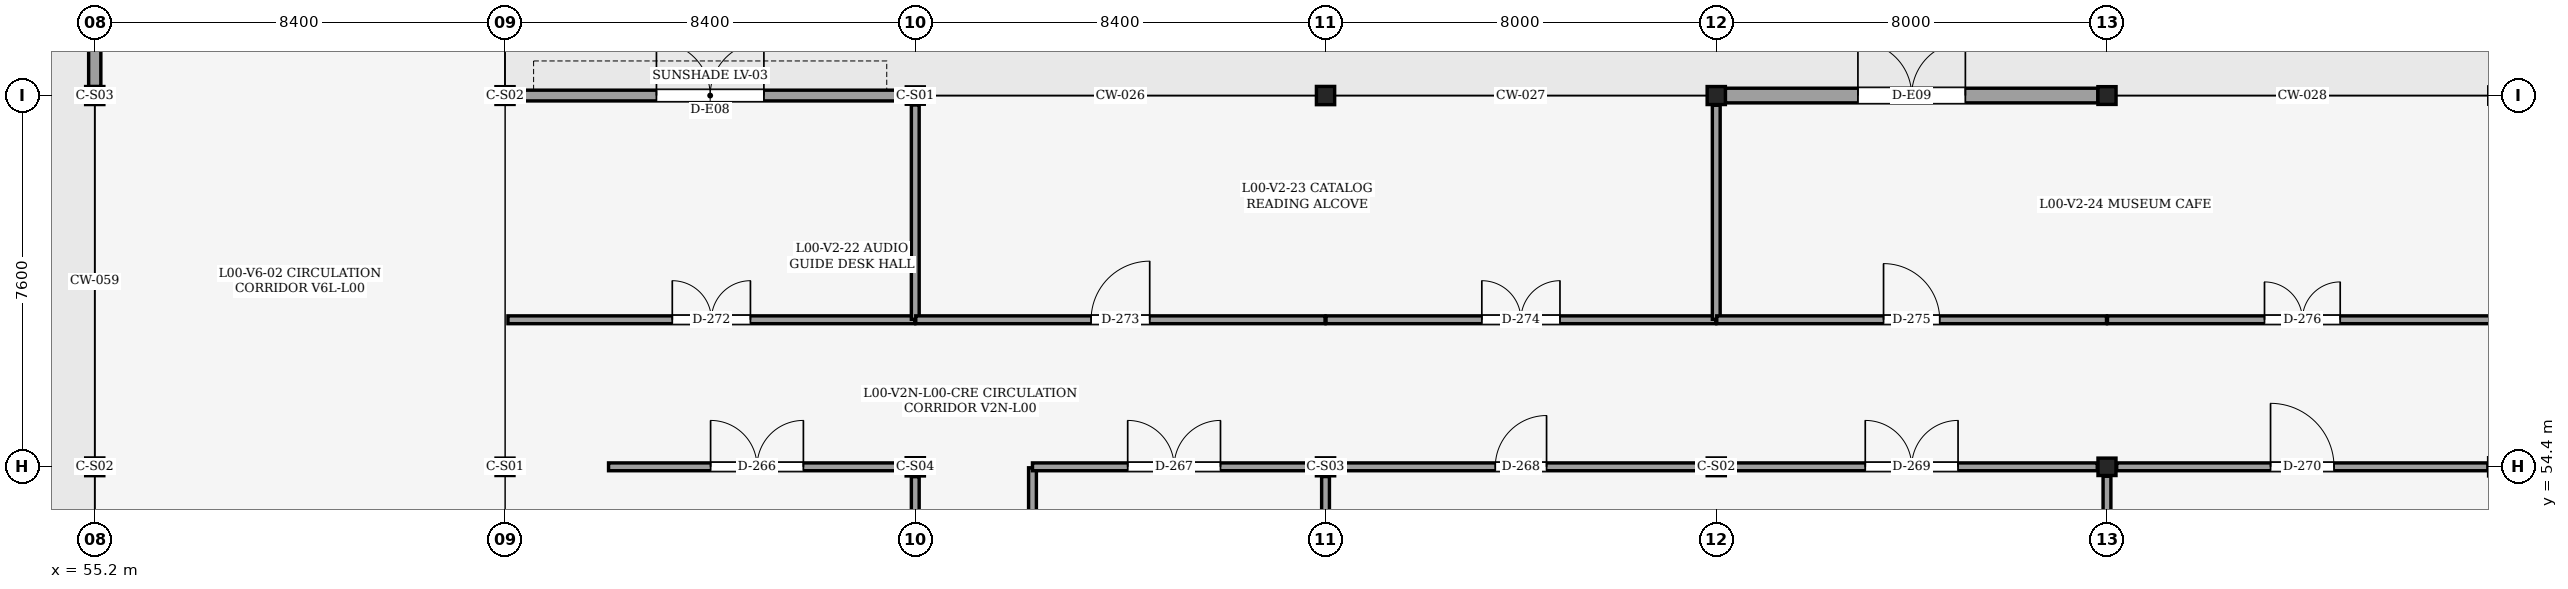
"""IFC4 building model, lengths in metres.
Left out: names, types, materials, properties, quantities, classifications, styles, units other than length and angle.
Written with IfcOpenShell. Run it as: python <this file> out.ifc"""

import sys

from ifc_helpers import new_model, si_unit, direction, frame, frame_2d, origin, origin_2d, place, context, subcontext, project, spatial, rectangle, i_section, extrude, element, fill, save


model = new_model("IFC4")
c1 = context("Model", 3, precision=1e-05, world=origin(), true_north=direction((0.0, 1.0)))
c2 = subcontext(c1, "Body", "Model", "MODEL_VIEW")
j1 = project(units=[si_unit("LENGTHUNIT", "METRE"), si_unit("PLANEANGLEUNIT", "RADIAN")], contexts=[c1])
p1 = place(None, origin())
s1 = spatial("IfcSite", under=j1, at=p1, CompositionType="ELEMENT")
p2 = place(p1, origin())
s2 = spatial("IfcBuilding", under=s1, at=p2, CompositionType="ELEMENT")
p3 = place(p2, origin())
s3 = spatial("IfcBuildingStorey", under=s2, at=p3, CompositionType="ELEMENT", Elevation=0.0)
p4 = place(p3, frame((55.2, 54.4, 0.0), z_axis=(0.0, 0.0, 1.0), x_axis=(1.0, 0.0, 0.0)))
e1 = element("IfcColumn", 1, at=p4, inside=s3, PredefinedType="COLUMN", context=c2, shape_type="SweptSolid", body=[
    extrude(i_section(OverallWidth=0.371, OverallDepth=0.363, WebThickness=0.013, FlangeThickness=0.022, FilletRadius=0.025, at=origin_2d()), origin(), (0.0, 0.0, 1.0), 5.4),
])
p5 = place(p3, frame((55.2, 62.0, 0.0), z_axis=(0.0, 0.0, 1.0), x_axis=(1.0, 0.0, 0.0)))
e2 = element("IfcColumn", 2, at=p5, inside=s3, PredefinedType="COLUMN", context=c2, shape_type="SweptSolid", body=[
    extrude(i_section(OverallWidth=0.373, OverallDepth=0.368, WebThickness=0.015, FlangeThickness=0.024, FilletRadius=0.025, at=origin_2d()), origin(), (0.0, 0.0, 1.0), 5.4),
])
p6 = place(p3, frame((63.6, 54.4, 0.0), z_axis=(0.0, 0.0, 1.0), x_axis=(1.0, 0.0, 0.0)))
e3 = element("IfcColumn", 3, at=p6, inside=s3, PredefinedType="COLUMN", context=c2, shape_type="SweptSolid", body=[
    extrude(i_section(OverallWidth=0.368, OverallDepth=0.356, WebThickness=0.011, FlangeThickness=0.018, FilletRadius=0.025, at=origin_2d()), origin(), (0.0, 0.0, 1.0), 5.4),
])
p7 = place(p3, frame((63.6, 62.0, 0.0), z_axis=(0.0, 0.0, 1.0), x_axis=(1.0, 0.0, 0.0)))
e4 = element("IfcColumn", 4, at=p7, inside=s3, PredefinedType="COLUMN", context=c2, shape_type="SweptSolid", body=[
    extrude(i_section(OverallWidth=0.371, OverallDepth=0.363, WebThickness=0.013, FlangeThickness=0.022, FilletRadius=0.025, at=origin_2d()), origin(), (0.0, 0.0, 1.0), 5.4),
])
p8 = place(p3, frame((72.0, 54.4, 0.0), z_axis=(0.0, 0.0, 1.0), x_axis=(1.0, 0.0, 0.0)))
e5 = element("IfcColumn", 5, at=p8, inside=s3, PredefinedType="COLUMN", context=c2, shape_type="SweptSolid", body=[
    extrude(i_section(OverallWidth=0.373, OverallDepth=0.373, WebThickness=0.016, FlangeThickness=0.026, FilletRadius=0.025, at=origin_2d()), origin(), (0.0, 0.0, 1.0), 5.4),
])
p9 = place(p3, frame((72.0, 62.0, 0.0), z_axis=(0.0, 0.0, 1.0), x_axis=(1.0, 0.0, 0.0)))
e6 = element("IfcColumn", 6, at=p9, inside=s3, PredefinedType="COLUMN", context=c2, shape_type="SweptSolid", body=[
    extrude(i_section(OverallWidth=0.368, OverallDepth=0.356, WebThickness=0.011, FlangeThickness=0.018, FilletRadius=0.025, at=origin_2d()), origin(), (0.0, 0.0, 1.0), 5.4),
])
p10 = place(p3, frame((80.4, 54.4, 0.0), z_axis=(0.0, 0.0, 1.0), x_axis=(1.0, 0.0, 0.0)))
e7 = element("IfcColumn", 7, at=p10, inside=s3, PredefinedType="COLUMN", context=c2, shape_type="SweptSolid", body=[
    extrude(i_section(OverallWidth=0.373, OverallDepth=0.368, WebThickness=0.015, FlangeThickness=0.024, FilletRadius=0.025, at=origin_2d()), origin(), (0.0, 0.0, 1.0), 5.4),
])
p11 = place(p3, frame((80.4, 62.0, 0.0), z_axis=(0.0, 0.0, 1.0), x_axis=(1.0, 0.0, 0.0)))
e8 = element("IfcColumn", 8, at=p11, inside=s3, PredefinedType="COLUMN", context=c2, shape_type="SweptSolid", body=[
    extrude(i_section(OverallWidth=0.373, OverallDepth=0.373, WebThickness=0.016, FlangeThickness=0.026, FilletRadius=0.025, at=origin_2d()), origin(), (0.0, 0.0, 1.0), 5.4),
])
p12 = place(p3, frame((88.4, 54.4, 0.0), z_axis=(0.0, 0.0, 1.0), x_axis=(1.0, 0.0, 0.0)))
e9 = element("IfcColumn", 9, at=p12, inside=s3, PredefinedType="COLUMN", context=c2, shape_type="SweptSolid", body=[
    extrude(i_section(OverallWidth=0.371, OverallDepth=0.363, WebThickness=0.013, FlangeThickness=0.022, FilletRadius=0.025, at=origin_2d()), origin(), (0.0, 0.0, 1.0), 5.4),
])
p13 = place(p3, frame((88.4, 62.0, 0.0), z_axis=(0.0, 0.0, 1.0), x_axis=(1.0, 0.0, 0.0)))
e10 = element("IfcColumn", 10, at=p13, inside=s3, PredefinedType="COLUMN", context=c2, shape_type="SweptSolid", body=[
    extrude(i_section(OverallWidth=0.373, OverallDepth=0.368, WebThickness=0.015, FlangeThickness=0.024, FilletRadius=0.025, at=origin_2d()), origin(), (0.0, 0.0, 1.0), 5.4),
])
p14 = place(p3, frame((96.4, 54.4, 0.0), z_axis=(0.0, 0.0, 1.0), x_axis=(1.0, 0.0, 0.0)))
e11 = element("IfcColumn", 11, at=p14, inside=s3, PredefinedType="COLUMN", context=c2, shape_type="SweptSolid", body=[
    extrude(i_section(OverallWidth=0.368, OverallDepth=0.356, WebThickness=0.011, FlangeThickness=0.018, FilletRadius=0.025, at=origin_2d()), origin(), (0.0, 0.0, 1.0), 5.4),
])
p15 = place(p3, frame((96.4, 62.0, 0.0), z_axis=(0.0, 0.0, 1.0), x_axis=(1.0, 0.0, 0.0)))
e12 = element("IfcColumn", 12, at=p15, inside=s3, PredefinedType="COLUMN", context=c2, shape_type="SweptSolid", body=[
    extrude(i_section(OverallWidth=0.371, OverallDepth=0.363, WebThickness=0.013, FlangeThickness=0.022, FilletRadius=0.025, at=origin_2d()), origin(), (0.0, 0.0, 1.0), 5.4),
])
p16 = place(p3, frame((63.785, 62.0, 0.0), z_axis=(0.0, 0.0, 1.0), x_axis=(1.0, 0.0, 0.0)))
e13 = element("IfcWall", 13, at=p16, inside=s3, PredefinedType="SOLIDWALL", context=c2, shape_type="SweptSolid", body=[
    extrude(rectangle(XDim=8.031, YDim=0.22, at=frame_2d((4.015, 0.0))), origin(), (0.0, 0.0, 1.0), 4.886),
])
p17 = place(p16, frame((2.915, 0.0, 0.0)))
e14 = element("IfcOpeningElement", 14, at=p17, cuts=e13, PredefinedType="OPENING", context=c2, shape_type="SweptSolid", body=[
    extrude(rectangle(XDim=2.2, YDim=2.4, at=frame_2d((1.1, 1.2))), frame((0.0, 0.12, 0.0), z_axis=(0.0, -1.0, 0.0), x_axis=(1.0, 0.0, 0.0)), (0.0, 0.0, 1.0), 0.24),
])
p18 = place(p3, frame((88.586, 62.0, 0.0), z_axis=(0.0, 0.0, 1.0), x_axis=(1.0, 0.0, 0.0)))
e15 = element("IfcWall", 15, at=p18, inside=s3, PredefinedType="SOLIDWALL", context=c2, shape_type="SweptSolid", body=[
    extrude(rectangle(XDim=7.628, YDim=0.3, at=frame_2d((3.814, 0.0))), origin(), (0.0, 0.0, 1.0), 4.886),
])
p19 = place(p18, frame((2.714, 0.0, 0.0)))
e16 = element("IfcOpeningElement", 16, at=p19, cuts=e15, PredefinedType="OPENING", context=c2, shape_type="SweptSolid", body=[
    extrude(rectangle(XDim=2.2, YDim=2.4, at=frame_2d((1.1, 1.2))), frame((0.0, 0.16, 0.0), z_axis=(0.0, -1.0, 0.0), x_axis=(1.0, 0.0, 0.0)), (0.0, 0.0, 1.0), 0.321),
])
p20 = place(p3, frame((55.2, 62.184, 0.0), z_axis=(0.0, 0.0, 1.0), x_axis=(0.0, 1.0, 0.0)))
e17 = element("IfcWall", 17, at=p20, inside=s3, PredefinedType="SOLIDWALL", context=c2, shape_type="SweptSolid", body=[
    extrude(rectangle(XDim=7.229, YDim=0.25, at=frame_2d((3.615, 0.0))), origin(), (0.0, 0.0, 1.0), 4.533),
])
p21 = place(p20, frame((0.75, 0.0, 0.9)))
e18 = element("IfcOpeningElement", 18, at=p21, cuts=e17, PredefinedType="OPENING", context=c2, shape_type="SweptSolid", body=[
    extrude(rectangle(XDim=1.2, YDim=1.5, at=frame_2d((0.6, 0.75))), frame((0.0, 0.135, 0.0), z_axis=(0.0, -1.0, 0.0), x_axis=(1.0, 0.0, 0.0)), (0.0, 0.0, 1.0), 0.271),
])
p22 = place(p3, frame((65.72, 54.4, 0.0), z_axis=(0.0, 0.0, 1.0), x_axis=(1.0, 0.0, 0.0)))
e19 = element("IfcWall", 19, at=p22, inside=s3, PredefinedType="PARTITIONING", context=c2, shape_type="SweptSolid", body=[
    extrude(rectangle(XDim=6.079, YDim=0.16, at=frame_2d((3.039, 0.0))), origin(), (0.0, 0.0, 1.0), 4.518),
])
p23 = place(p22, frame((2.089, 0.0, 0.0)))
e20 = element("IfcOpeningElement", 20, at=p23, cuts=e19, PredefinedType="OPENING", context=c2, shape_type="SweptSolid", body=[
    extrude(rectangle(XDim=1.9, YDim=2.45, at=frame_2d((0.95, 1.225))), frame((0.0, 0.09, 0.0), z_axis=(0.0, -1.0, 0.0), x_axis=(1.0, 0.0, 0.0)), (0.0, 0.0, 1.0), 0.18),
])
p24 = place(p3, frame((72.0, 47.023, 0.0), z_axis=(0.0, 0.0, 1.0), x_axis=(0.0, 1.0, 0.0)))
e21 = element("IfcWall", 21, at=p24, inside=s3, PredefinedType="PARTITIONING", context=c2, shape_type="SweptSolid", body=[
    extrude(rectangle(XDim=7.175, YDim=0.16, at=frame_2d((3.587, 0.0))), origin(), (0.0, 0.0, 1.0), 4.533),
])
p25 = place(p3, frame((74.4, 46.84, 0.0), z_axis=(0.0, 0.0, 1.0), x_axis=(0.0, 1.0, 0.0)))
e22 = element("IfcWall", 22, at=p25, inside=s3, PredefinedType="PARTITIONING", context=c2, shape_type="SweptSolid", body=[
    extrude(rectangle(XDim=7.54, YDim=0.16, at=frame_2d((3.77, 0.0))), origin(), (0.0, 0.0, 1.0), 5.14),
])
p26 = place(p3, frame((74.4, 54.4, 0.0), z_axis=(0.0, 0.0, 1.0), x_axis=(1.0, 0.0, 0.0)))
e23 = element("IfcWall", 23, at=p26, inside=s3, PredefinedType="PARTITIONING", context=c2, shape_type="SweptSolid", body=[
    extrude(rectangle(XDim=5.799, YDim=0.16, at=frame_2d((2.899, 0.0))), origin(), (0.0, 0.0, 1.0), 4.528),
])
p27 = place(p26, frame((1.949, 0.0, 0.0)))
e24 = element("IfcOpeningElement", 24, at=p27, cuts=e23, PredefinedType="OPENING", context=c2, shape_type="SweptSolid", body=[
    extrude(rectangle(XDim=1.9, YDim=2.45, at=frame_2d((0.95, 1.225))), frame((0.0, 0.09, 0.0), z_axis=(0.0, -1.0, 0.0), x_axis=(1.0, 0.0, 0.0)), (0.0, 0.0, 1.0), 0.18),
])
p28 = place(p3, frame((80.4, 47.014, 0.0), z_axis=(0.0, 0.0, 1.0), x_axis=(0.0, 1.0, 0.0)))
e25 = element("IfcWall", 25, at=p28, inside=s3, PredefinedType="PARTITIONING", context=c2, shape_type="SweptSolid", body=[
    extrude(rectangle(XDim=7.187, YDim=0.16, at=frame_2d((3.593, 0.0))), origin(), (0.0, 0.0, 1.0), 4.607),
])
p29 = place(p3, frame((80.602, 54.4, 0.0), z_axis=(0.0, 0.0, 1.0), x_axis=(1.0, 0.0, 0.0)))
e26 = element("IfcWall", 26, at=p29, inside=s3, PredefinedType="PARTITIONING", context=c2, shape_type="SweptSolid", body=[
    extrude(rectangle(XDim=7.598, YDim=0.16, at=frame_2d((3.799, 0.0))), origin(), (0.0, 0.0, 1.0), 4.678),
])
p30 = place(p29, frame((3.274, 0.0, 0.0)))
e27 = element("IfcOpeningElement", 27, at=p30, cuts=e26, PredefinedType="OPENING", context=c2, shape_type="SweptSolid", body=[
    extrude(rectangle(XDim=1.05, YDim=2.15, at=frame_2d((0.525, 1.075))), frame((0.0, 0.09, 0.0), z_axis=(0.0, -1.0, 0.0), x_axis=(1.0, 0.0, 0.0)), (0.0, 0.0, 1.0), 0.18),
])
p31 = place(p3, frame((88.601, 54.4, 0.0), z_axis=(0.0, 0.0, 1.0), x_axis=(1.0, 0.0, 0.0)))
e28 = element("IfcWall", 28, at=p31, inside=s3, PredefinedType="PARTITIONING", context=c2, shape_type="SweptSolid", body=[
    extrude(rectangle(XDim=7.6, YDim=0.16, at=frame_2d((3.8, 0.0))), origin(), (0.0, 0.0, 1.0), 4.533),
])
p32 = place(p31, frame((2.85, 0.0, 0.0)))
e29 = element("IfcOpeningElement", 29, at=p32, cuts=e28, PredefinedType="OPENING", context=c2, shape_type="SweptSolid", body=[
    extrude(rectangle(XDim=1.9, YDim=2.45, at=frame_2d((0.95, 1.225))), frame((0.0, 0.09, 0.0), z_axis=(0.0, -1.0, 0.0), x_axis=(1.0, 0.0, 0.0)), (0.0, 0.0, 1.0), 0.18),
])
p33 = place(p3, frame((96.4, 47.001, 0.0), z_axis=(0.0, 0.0, 1.0), x_axis=(0.0, 1.0, 0.0)))
e30 = element("IfcWall", 30, at=p33, inside=s3, PredefinedType="PARTITIONING", context=c2, shape_type="SweptSolid", body=[
    extrude(rectangle(XDim=7.206, YDim=0.16, at=frame_2d((3.603, 0.0))), origin(), (0.0, 0.0, 1.0), 4.528),
])
p34 = place(p3, frame((96.599, 54.4, 0.0), z_axis=(0.0, 0.0, 1.0), x_axis=(1.0, 0.0, 0.0)))
e31 = element("IfcWall", 31, at=p34, inside=s3, PredefinedType="PARTITIONING", context=c2, shape_type="SweptSolid", body=[
    extrude(rectangle(XDim=7.599, YDim=0.16, at=frame_2d((3.8, 0.0))), origin(), (0.0, 0.0, 1.0), 4.591),
])
p35 = place(p34, frame((3.15, 0.0, 0.0)))
e32 = element("IfcOpeningElement", 32, at=p35, cuts=e31, PredefinedType="OPENING", context=c2, shape_type="SweptSolid", body=[
    extrude(rectangle(XDim=1.3, YDim=2.2, at=frame_2d((0.65, 1.1))), frame((0.0, 0.09, 0.0), z_axis=(0.0, -1.0, 0.0), x_axis=(1.0, 0.0, 0.0)), (0.0, 0.0, 1.0), 0.18),
])
p36 = place(p3, frame((63.66, 57.41, 0.0), z_axis=(0.0, 0.0, 1.0), x_axis=(1.0, 0.0, 0.0)))
e33 = element("IfcWall", 33, at=p36, inside=s3, PredefinedType="PARTITIONING", context=c2, shape_type="SweptSolid", body=[
    extrude(rectangle(XDim=8.33, YDim=0.16, at=frame_2d((4.165, 0.0))), origin(), (0.0, 0.0, 1.0), 5.14),
])
p37 = place(p36, frame((3.365, 0.0, 0.0)))
e34 = element("IfcOpeningElement", 34, at=p37, cuts=e33, PredefinedType="OPENING", context=c2, shape_type="SweptSolid", body=[
    extrude(rectangle(XDim=1.6, YDim=2.35, at=frame_2d((0.8, 1.175))), frame((0.0, 0.09, 0.0), z_axis=(0.0, -1.0, 0.0), x_axis=(1.0, 0.0, 0.0)), (0.0, 0.0, 1.0), 0.18),
])
p38 = place(p3, frame((72.0, 57.42, 0.0), z_axis=(0.0, 0.0, 1.0), x_axis=(0.0, 1.0, 0.0)))
e35 = element("IfcWall", 35, at=p38, inside=s3, PredefinedType="PARTITIONING", context=c2, shape_type="SweptSolid", body=[
    extrude(rectangle(XDim=4.387, YDim=0.16, at=frame_2d((2.193, 0.0))), origin(), (0.0, 0.0, 1.0), 4.607),
])
p39 = place(p3, frame((72.01, 57.41, 0.0), z_axis=(0.0, 0.0, 1.0), x_axis=(1.0, 0.0, 0.0)))
e36 = element("IfcWall", 36, at=p39, inside=s3, PredefinedType="PARTITIONING", context=c2, shape_type="SweptSolid", body=[
    extrude(rectangle(XDim=8.38, YDim=0.16, at=frame_2d((4.19, 0.0))), origin(), (0.0, 0.0, 1.0), 5.14),
])
p40 = place(p39, frame((3.59, 0.0, 0.0)))
e37 = element("IfcOpeningElement", 37, at=p40, cuts=e36, PredefinedType="OPENING", context=c2, shape_type="SweptSolid", body=[
    extrude(rectangle(XDim=1.2, YDim=2.2, at=frame_2d((0.6, 1.1))), frame((0.0, 0.09, 0.0), z_axis=(0.0, -1.0, 0.0), x_axis=(1.0, 0.0, 0.0)), (0.0, 0.0, 1.0), 0.18),
])
p41 = place(p3, frame((80.41, 57.41, 0.0), z_axis=(0.0, 0.0, 1.0), x_axis=(1.0, 0.0, 0.0)))
e38 = element("IfcWall", 38, at=p41, inside=s3, PredefinedType="PARTITIONING", context=c2, shape_type="SweptSolid", body=[
    extrude(rectangle(XDim=7.98, YDim=0.16, at=frame_2d((3.99, 0.0))), origin(), (0.0, 0.0, 1.0), 5.14),
])
p42 = place(p41, frame((3.19, 0.0, 0.0)))
e39 = element("IfcOpeningElement", 39, at=p42, cuts=e38, PredefinedType="OPENING", context=c2, shape_type="SweptSolid", body=[
    extrude(rectangle(XDim=1.6, YDim=2.35, at=frame_2d((0.8, 1.175))), frame((0.0, 0.09, 0.0), z_axis=(0.0, -1.0, 0.0), x_axis=(1.0, 0.0, 0.0)), (0.0, 0.0, 1.0), 0.18),
])
p43 = place(p3, frame((88.4, 57.42, 0.0), z_axis=(0.0, 0.0, 1.0), x_axis=(0.0, 1.0, 0.0)))
e40 = element("IfcWall", 40, at=p43, inside=s3, PredefinedType="PARTITIONING", context=c2, shape_type="SweptSolid", body=[
    extrude(rectangle(XDim=4.381, YDim=0.16, at=frame_2d((2.19, 0.0))), origin(), (0.0, 0.0, 1.0), 4.528),
])
p44 = place(p3, frame((88.41, 57.41, 0.0), z_axis=(0.0, 0.0, 1.0), x_axis=(1.0, 0.0, 0.0)))
e41 = element("IfcWall", 41, at=p44, inside=s3, PredefinedType="PARTITIONING", context=c2, shape_type="SweptSolid", body=[
    extrude(rectangle(XDim=7.98, YDim=0.16, at=frame_2d((3.99, 0.0))), origin(), (0.0, 0.0, 1.0), 5.14),
])
p45 = place(p44, frame((3.415, 0.0, 0.0)))
e42 = element("IfcOpeningElement", 42, at=p45, cuts=e41, PredefinedType="OPENING", context=c2, shape_type="SweptSolid", body=[
    extrude(rectangle(XDim=1.15, YDim=2.2, at=frame_2d((0.575, 1.1))), frame((0.0, 0.09, 0.0), z_axis=(0.0, -1.0, 0.0), x_axis=(1.0, 0.0, 0.0)), (0.0, 0.0, 1.0), 0.18),
])
p46 = place(p3, frame((96.41, 57.41, 0.0), z_axis=(0.0, 0.0, 1.0), x_axis=(1.0, 0.0, 0.0)))
e43 = element("IfcWall", 43, at=p46, inside=s3, PredefinedType="PARTITIONING", context=c2, shape_type="SweptSolid", body=[
    extrude(rectangle(XDim=7.98, YDim=0.16, at=frame_2d((3.99, 0.0))), origin(), (0.0, 0.0, 1.0), 5.14),
])
p47 = place(p46, frame((3.215, 0.0, 0.0)))
e44 = element("IfcOpeningElement", 44, at=p47, cuts=e43, PredefinedType="OPENING", context=c2, shape_type="SweptSolid", body=[
    extrude(rectangle(XDim=1.55, YDim=2.3, at=frame_2d((0.775, 1.15))), frame((0.0, 0.09, 0.0), z_axis=(0.0, -1.0, 0.0), x_axis=(1.0, 0.0, 0.0)), (0.0, 0.0, 1.0), 0.18),
])
p48 = place(p17, origin())
e45 = element("IfcDoor", 45, at=p48, inside=s3, OperationType="DOUBLE_DOOR_SINGLE_SWING", PredefinedType="DOOR", context=c2, shape_type="SweptSolid", body=[
    extrude(rectangle(XDim=2.2, YDim=2.4, at=frame_2d((1.1, 1.2))), frame((0.0, 0.025, 0.0), z_axis=(0.0, -1.0, 0.0), x_axis=(1.0, 0.0, 0.0)), (0.0, 0.0, 1.0), 0.05),
])
fill(e14, e45)
p49 = place(p19, origin())
e46 = element("IfcDoor", 46, at=p49, inside=s3, OperationType="DOUBLE_DOOR_SINGLE_SWING", PredefinedType="DOOR", context=c2, shape_type="SweptSolid", body=[
    extrude(rectangle(XDim=2.2, YDim=2.4, at=frame_2d((1.1, 1.2))), frame((0.0, 0.025, 0.0), z_axis=(0.0, -1.0, 0.0), x_axis=(1.0, 0.0, 0.0)), (0.0, 0.0, 1.0), 0.05),
])
fill(e16, e46)
p50 = place(p23, origin())
e47 = element("IfcDoor", 47, at=p50, inside=s3, OperationType="DOUBLE_DOOR_SINGLE_SWING", PredefinedType="DOOR", context=c2, shape_type="SweptSolid", body=[
    extrude(rectangle(XDim=1.9, YDim=2.45, at=frame_2d((0.95, 1.225))), frame((0.0, 0.025, 0.0), z_axis=(0.0, -1.0, 0.0), x_axis=(1.0, 0.0, 0.0)), (0.0, 0.0, 1.0), 0.05),
])
fill(e20, e47)
p51 = place(p27, origin())
e48 = element("IfcDoor", 48, at=p51, inside=s3, OperationType="DOUBLE_DOOR_SINGLE_SWING", PredefinedType="DOOR", context=c2, shape_type="SweptSolid", body=[
    extrude(rectangle(XDim=1.9, YDim=2.45, at=frame_2d((0.95, 1.225))), frame((0.0, 0.025, 0.0), z_axis=(0.0, -1.0, 0.0), x_axis=(1.0, 0.0, 0.0)), (0.0, 0.0, 1.0), 0.05),
])
fill(e24, e48)
p52 = place(p30, origin())
e49 = element("IfcDoor", 49, at=p52, inside=s3, OperationType="SINGLE_SWING_RIGHT", PredefinedType="DOOR", context=c2, shape_type="SweptSolid", body=[
    extrude(rectangle(XDim=1.05, YDim=2.15, at=frame_2d((0.525, 1.075))), frame((0.0, 0.025, 0.0), z_axis=(0.0, -1.0, 0.0), x_axis=(1.0, 0.0, 0.0)), (0.0, 0.0, 1.0), 0.05),
])
fill(e27, e49)
p53 = place(p32, origin())
e50 = element("IfcDoor", 50, at=p53, inside=s3, OperationType="DOUBLE_DOOR_SINGLE_SWING", PredefinedType="DOOR", context=c2, shape_type="SweptSolid", body=[
    extrude(rectangle(XDim=1.9, YDim=2.45, at=frame_2d((0.95, 1.225))), frame((0.0, 0.025, 0.0), z_axis=(0.0, -1.0, 0.0), x_axis=(1.0, 0.0, 0.0)), (0.0, 0.0, 1.0), 0.05),
])
fill(e29, e50)
p54 = place(p35, origin())
e51 = element("IfcDoor", 51, at=p54, inside=s3, OperationType="SINGLE_SWING_LEFT", PredefinedType="DOOR", context=c2, shape_type="SweptSolid", body=[
    extrude(rectangle(XDim=1.3, YDim=2.2, at=frame_2d((0.65, 1.1))), frame((0.0, 0.025, 0.0), z_axis=(0.0, -1.0, 0.0), x_axis=(1.0, 0.0, 0.0)), (0.0, 0.0, 1.0), 0.05),
])
fill(e32, e51)
p55 = place(p37, origin())
e52 = element("IfcDoor", 52, at=p55, inside=s3, OperationType="DOUBLE_DOOR_SINGLE_SWING", PredefinedType="DOOR", context=c2, shape_type="SweptSolid", body=[
    extrude(rectangle(XDim=1.6, YDim=2.35, at=frame_2d((0.8, 1.175))), frame((0.0, 0.025, 0.0), z_axis=(0.0, -1.0, 0.0), x_axis=(1.0, 0.0, 0.0)), (0.0, 0.0, 1.0), 0.05),
])
fill(e34, e52)
p56 = place(p40, origin())
e53 = element("IfcDoor", 53, at=p56, inside=s3, OperationType="SINGLE_SWING_RIGHT", PredefinedType="DOOR", context=c2, shape_type="SweptSolid", body=[
    extrude(rectangle(XDim=1.2, YDim=2.2, at=frame_2d((0.6, 1.1))), frame((0.0, 0.025, 0.0), z_axis=(0.0, -1.0, 0.0), x_axis=(1.0, 0.0, 0.0)), (0.0, 0.0, 1.0), 0.05),
])
fill(e37, e53)
p57 = place(p42, origin())
e54 = element("IfcDoor", 54, at=p57, inside=s3, OperationType="DOUBLE_DOOR_SINGLE_SWING", PredefinedType="DOOR", context=c2, shape_type="SweptSolid", body=[
    extrude(rectangle(XDim=1.6, YDim=2.35, at=frame_2d((0.8, 1.175))), frame((0.0, 0.025, 0.0), z_axis=(0.0, -1.0, 0.0), x_axis=(1.0, 0.0, 0.0)), (0.0, 0.0, 1.0), 0.05),
])
fill(e39, e54)
p58 = place(p45, origin())
e55 = element("IfcDoor", 55, at=p58, inside=s3, OperationType="SINGLE_SWING_LEFT", PredefinedType="DOOR", context=c2, shape_type="SweptSolid", body=[
    extrude(rectangle(XDim=1.15, YDim=2.2, at=frame_2d((0.575, 1.1))), frame((0.0, 0.025, 0.0), z_axis=(0.0, -1.0, 0.0), x_axis=(1.0, 0.0, 0.0)), (0.0, 0.0, 1.0), 0.05),
])
fill(e42, e55)
p59 = place(p47, origin())
e56 = element("IfcDoor", 56, at=p59, inside=s3, OperationType="DOUBLE_DOOR_SINGLE_SWING", PredefinedType="DOOR", context=c2, shape_type="SweptSolid", body=[
    extrude(rectangle(XDim=1.55, YDim=2.3, at=frame_2d((0.775, 1.15))), frame((0.0, 0.025, 0.0), z_axis=(0.0, -1.0, 0.0), x_axis=(1.0, 0.0, 0.0)), (0.0, 0.0, 1.0), 0.05),
])
fill(e44, e56)
save(model, sys.argv[1])
